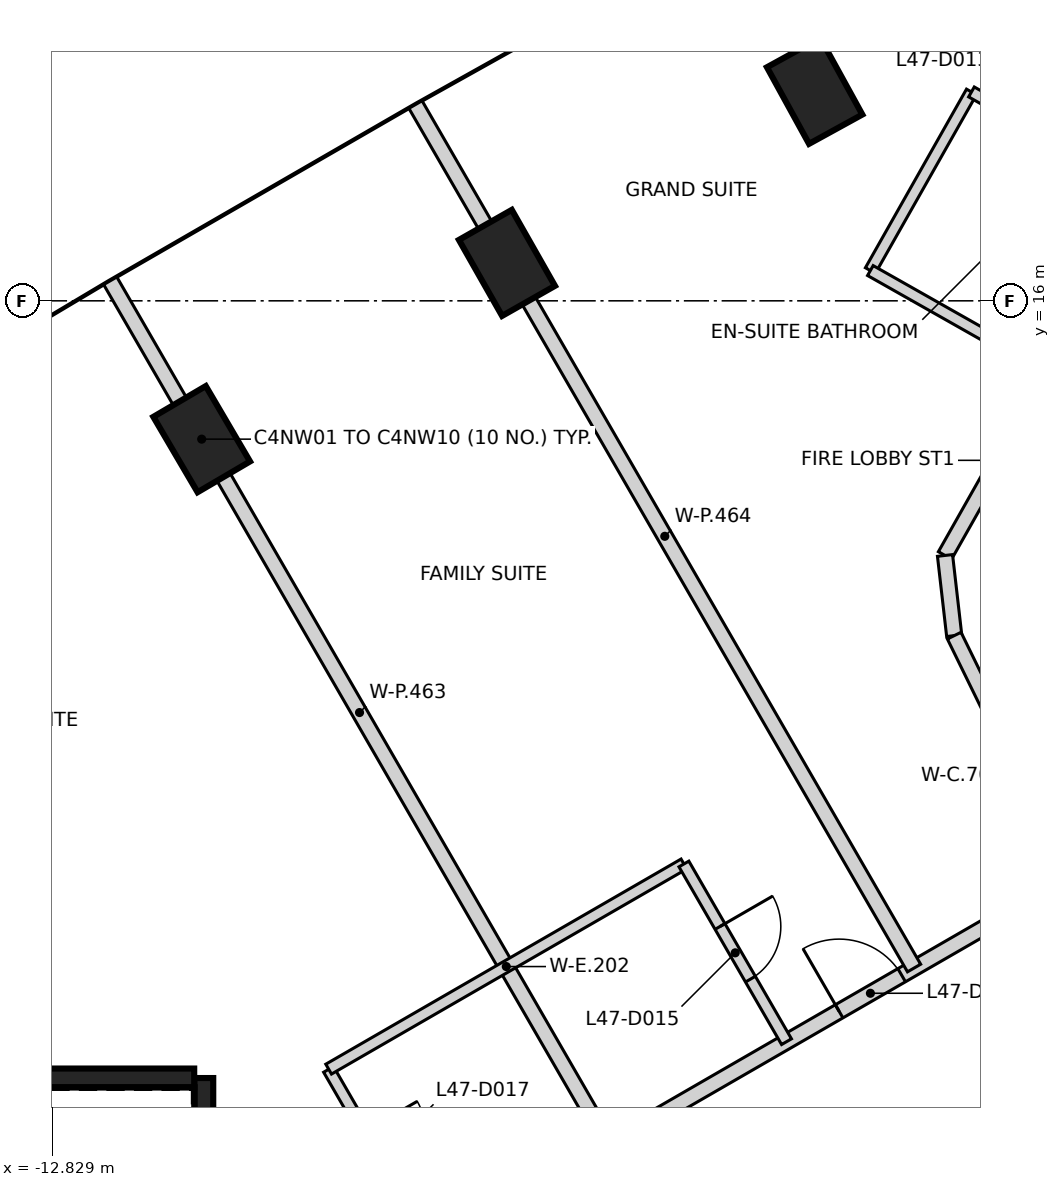
"""IFC4 building model, lengths in metres.
Left out: names, types, materials, properties, quantities, classifications, styles, units other than length and angle.
Written with IfcOpenShell. Run it as: python <this file> out.ifc"""

import sys

from ifc_helpers import new_model, si_unit, direction, frame, frame_2d, origin, origin_2d, place, context, subcontext, project, spatial, rectangle, extrude, element, fill, save


model = new_model("IFC4")
c1 = context("Model", 3, precision=1e-05, world=origin(), true_north=direction((0.0, 1.0)))
c2 = subcontext(c1, "Body", "Model", "MODEL_VIEW")
j1 = project(units=[si_unit("LENGTHUNIT", "METRE"), si_unit("PLANEANGLEUNIT", "RADIAN")], contexts=[c1])
p1 = place(None, origin())
s1 = spatial("IfcSite", under=j1, at=p1, CompositionType="ELEMENT")
p2 = place(p1, origin())
s2 = spatial("IfcBuilding", under=s1, at=p2, CompositionType="ELEMENT")
p3 = place(p2, frame((0.0, 0.0, 190.0)))
s3 = spatial("IfcBuildingStorey", under=s2, at=p3, CompositionType="ELEMENT", Elevation=190.0)
for number, where, z_axis, x_axis in (
    (1, (-2.8, 18.762, -0.35), (0.0, 0.0, 1.0), (-0.482, 0.876, 0.0)),
    (2, (-6.848, 16.499, -0.35), (0.0, 0.0, 1.0), (-0.494, 0.87, 0.0)),
    (3, (-10.864, 14.18, -0.35), (0.0, 0.0, 1.0), (-0.506, 0.862, 0.0)),
):
    element("IfcColumn", number, at=place(p3, frame(where, z_axis=z_axis, x_axis=x_axis)), inside=s3, PredefinedType="COLUMN", context=c2, shape_type="SweptSolid", body=[
        extrude(rectangle(XDim=1.15, YDim=0.8, at=origin_2d()), origin(), (0.0, 0.0, 1.0), 3.6),
    ])
p4 = place(p3, frame((-10.837, 5.775, 0.0), z_axis=(0.0, 0.0, 1.0), x_axis=(0.0, -1.0, 0.0)))
e4 = element("IfcWall", 4, at=p4, inside=s3, PredefinedType="SHEAR", context=c2, shape_type="SweptSolid", body=[
    extrude(rectangle(XDim=11.55, YDim=0.25, at=frame_2d((5.775, 0.0))), origin(), (0.0, 0.0, 1.0), 3.25),
])
p5 = place(p4, frame((10.025, 0.0, 0.0)))
e5 = element("IfcOpeningElement", 5, at=p5, cuts=e4, PredefinedType="OPENING", context=c2, shape_type="SweptSolid", body=[
    extrude(rectangle(XDim=1.2, YDim=2.1, at=frame_2d((0.6, 1.05))), frame((0.0, 0.135, 0.0), z_axis=(0.0, -1.0, 0.0), x_axis=(1.0, 0.0, 0.0)), (0.0, 0.0, 1.0), 0.27),
])
p6 = place(p4, frame((8.725, 0.0, 0.0)))
e6 = element("IfcOpeningElement", 6, at=p6, cuts=e4, PredefinedType="OPENING", context=c2, shape_type="SweptSolid", body=[
    extrude(rectangle(XDim=1.2, YDim=2.1, at=frame_2d((0.6, 1.05))), frame((0.0, 0.135, 0.0), z_axis=(0.0, -1.0, 0.0), x_axis=(1.0, 0.0, 0.0)), (0.0, 0.0, 1.0), 0.27),
])
p7 = place(p3, frame((-16.472, 5.775, 0.0), z_axis=(0.0, 0.0, 1.0), x_axis=(1.0, 0.0, 0.0)))
e7 = element("IfcWall", 7, at=p7, inside=s3, PredefinedType="SHEAR", context=c2, shape_type="SweptSolid", body=[
    extrude(rectangle(XDim=5.51, YDim=0.25, at=frame_2d((2.755, 0.0))), origin(), (0.0, 0.0, 1.0), 3.25),
])
p8 = place(p3, frame((-10.652, 1.934, 0.0), z_axis=(0.0, 0.0, 1.0), x_axis=(0.866066882415, 0.499928150021, 0.0)))
e8 = element("IfcWall", 8, at=p8, inside=s3, PredefinedType="PARTITIONING", context=c2, shape_type="SweptSolid", body=[
    extrude(rectangle(XDim=12.98, YDim=0.2, at=frame_2d((6.49, 0.0))), origin(), (0.0, 0.0, 1.0), 3.25),
])
p9 = place(p8, frame((9.439, 0.0, 0.0)))
e9 = element("IfcOpeningElement", 9, at=p9, cuts=e8, PredefinedType="OPENING", context=c2, shape_type="SweptSolid", body=[
    extrude(rectangle(XDim=0.95, YDim=2.1, at=frame_2d((0.475, 1.05))), frame((0.0, 0.11, 0.0), z_axis=(0.0, -1.0, 0.0), x_axis=(1.0, 0.0, 0.0)), (0.0, 0.0, 1.0), 0.22),
])
p10 = place(p8, frame((0.229, 0.0, 0.0)))
e10 = element("IfcOpeningElement", 10, at=p10, cuts=e8, PredefinedType="OPENING", context=c2, shape_type="SweptSolid", body=[
    extrude(rectangle(XDim=0.95, YDim=2.1, at=frame_2d((0.475, 1.05))), frame((0.0, 0.11, 0.0), z_axis=(0.0, -1.0, 0.0), x_axis=(1.0, 0.0, 0.0)), (0.0, 0.0, 1.0), 0.22),
])
p11 = place(p3, frame((-1.085, 12.65, 0.0), z_axis=(0.0, 0.0, 1.0), x_axis=(0.49243456751, 0.870349468157, 0.0)))
e11 = element("IfcWall", 11, at=p11, inside=s3, PredefinedType="PARTITIONING", context=c2, shape_type="SweptSolid", body=[
    extrude(rectangle(XDim=10.531, YDim=0.2, at=frame_2d((5.266, 0.0))), origin(), (0.0, 0.0, 1.0), 3.25),
])
p12 = place(p11, frame((7.499, 0.0, 0.0)))
e12 = element("IfcOpeningElement", 12, at=p12, cuts=e11, PredefinedType="OPENING", context=c2, shape_type="SweptSolid", body=[
    extrude(rectangle(XDim=1.0, YDim=2.1, at=frame_2d((0.5, 1.05))), frame((0.0, 0.11, 0.0), z_axis=(0.0, -1.0, 0.0), x_axis=(1.0, 0.0, 0.0)), (0.0, 0.0, 1.0), 0.22),
])
p13 = place(p3, frame((-1.085, 12.65, 0.0), z_axis=(0.0, 0.0, 1.0), x_axis=(0.113812454263, -0.993502252264, 0.0)))
e13 = element("IfcWall", 13, at=p13, inside=s3, PredefinedType="PARTITIONING", context=c2, shape_type="SweptSolid", body=[
    extrude(rectangle(XDim=1.062, YDim=0.2, at=frame_2d((0.531, 0.0))), origin(), (0.0, 0.0, 1.0), 3.25),
])
p14 = place(p3, frame((-0.964, 11.595, 0.0), z_axis=(0.0, 0.0, 1.0), x_axis=(0.439787800928, -0.898101714816, 0.0)))
e14 = element("IfcWall", 14, at=p14, inside=s3, PredefinedType="PARTITIONING", context=c2, shape_type="SweptSolid", body=[
    extrude(rectangle(XDim=3.532, YDim=0.2, at=frame_2d((1.766, 0.0))), origin(), (0.0, 0.0, 1.0), 3.25),
])
p15 = place(p14, frame((2.382, 0.0, 0.0)))
e15 = element("IfcOpeningElement", 15, at=p15, cuts=e14, PredefinedType="OPENING", context=c2, shape_type="SweptSolid", body=[
    extrude(rectangle(XDim=0.95, YDim=2.1, at=frame_2d((0.475, 1.05))), frame((0.0, 0.11, 0.0), z_axis=(0.0, -1.0, 0.0), x_axis=(1.0, 0.0, 0.0)), (0.0, 0.0, 1.0), 0.22),
])
p16 = place(p3, frame((-12.067, 16.263, 0.0), z_axis=(0.0, 0.0, 1.0), x_axis=(0.500016190239, -0.866016056144, 0.0)))
e16 = element("IfcWall", 16, at=p16, inside=s3, PredefinedType="PARTITIONING", context=c2, shape_type="SweptSolid", body=[
    extrude(rectangle(XDim=13.118, YDim=0.2, at=frame_2d((6.559, 0.0))), origin(), (0.0, 0.0, 1.0), 3.25),
])
p17 = place(p3, frame((-8.052, 18.582, 0.0), z_axis=(0.0, 0.0, 1.0), x_axis=(0.500046266189, -0.86599869034, 0.0)))
e17 = element("IfcWall", 17, at=p17, inside=s3, PredefinedType="PARTITIONING", context=c2, shape_type="SweptSolid", body=[
    extrude(rectangle(XDim=13.118, YDim=0.2, at=frame_2d((6.559, 0.0))), origin(), (0.0, 0.0, 1.0), 3.25),
])
p18 = place(p3, frame((-1.232, 22.345, 0.0), z_axis=(0.0, 0.0, 1.0), x_axis=(0.499942901263, -0.866058367246, 0.0)))
e18 = element("IfcWall", 18, at=p18, inside=s3, PredefinedType="PARTITIONING", context=c2, shape_type="SweptSolid", body=[
    extrude(rectangle(XDim=5.688, YDim=0.2, at=frame_2d((2.844, 0.0))), origin(), (0.0, 0.0, 1.0), 2.35),
])
p19 = place(p3, frame((-9.195, 5.889, 0.0), z_axis=(0.0, 0.0, 1.0), x_axis=(0.500129820725, -0.865950438779, 0.0)))
e19 = element("IfcWall", 19, at=p19, inside=s3, PredefinedType="PARTITIONING", context=c2, shape_type="SweptSolid", body=[
    extrude(rectangle(XDim=2.698, YDim=0.15, at=frame_2d((1.349, 0.0))), origin(), (0.0, 0.0, 1.0), 3.25),
])
p20 = place(p19, frame((0.948, 0.0, 0.0)))
e20 = element("IfcOpeningElement", 20, at=p20, cuts=e19, PredefinedType="OPENING", context=c2, shape_type="SweptSolid", body=[
    extrude(rectangle(XDim=0.8, YDim=2.1, at=frame_2d((0.4, 1.05))), frame((0.0, 0.085, 0.0), z_axis=(0.0, -1.0, 0.0), x_axis=(1.0, 0.0, 0.0)), (0.0, 0.0, 1.0), 0.17),
])
p21 = place(p3, frame((-9.194, 5.892, 0.0), z_axis=(0.0, 0.0, 1.0), x_axis=(0.8659934935, 0.500055266161, 0.0)))
e21 = element("IfcWall", 21, at=p21, inside=s3, PredefinedType="PARTITIONING", context=c2, shape_type="SweptSolid", body=[
    extrude(rectangle(XDim=5.397, YDim=0.15, at=frame_2d((2.699, 0.0))), origin(), (0.0, 0.0, 1.0), 3.25),
])
p22 = place(p3, frame((-4.52, 8.591, 0.0), z_axis=(0.0, 0.0, 1.0), x_axis=(0.500048589285, -0.86599734893, 0.0)))
e22 = element("IfcWall", 22, at=p22, inside=s3, PredefinedType="PARTITIONING", context=c2, shape_type="SweptSolid", body=[
    extrude(rectangle(XDim=2.7, YDim=0.15, at=frame_2d((1.35, 0.0))), origin(), (0.0, 0.0, 1.0), 3.25),
])
p23 = place(p22, frame((0.95, 0.0, 0.0)))
e23 = element("IfcOpeningElement", 23, at=p23, cuts=e22, PredefinedType="OPENING", context=c2, shape_type="SweptSolid", body=[
    extrude(rectangle(XDim=0.8, YDim=2.1, at=frame_2d((0.4, 1.05))), frame((0.0, 0.085, 0.0), z_axis=(0.0, -1.0, 0.0), x_axis=(1.0, 0.0, 0.0)), (0.0, 0.0, 1.0), 0.17),
])
p24 = place(p3, frame((-2.067, 16.398, 0.0), z_axis=(0.0, 0.0, 1.0), x_axis=(0.492483230042, 0.870321933613, 0.0)))
e24 = element("IfcWall", 24, at=p24, inside=s3, PredefinedType="PARTITIONING", context=c2, shape_type="SweptSolid", body=[
    extrude(rectangle(XDim=2.7, YDim=0.15, at=frame_2d((1.35, 0.0))), origin(), (0.0, 0.0, 1.0), 3.25),
])
p25 = place(p3, frame((-2.067, 16.398, 0.0), z_axis=(0.0, 0.0, 1.0), x_axis=(0.870300002118, -0.492521985614, 0.0)))
e25 = element("IfcWall", 25, at=p25, inside=s3, PredefinedType="PARTITIONING", context=c2, shape_type="SweptSolid", body=[
    extrude(rectangle(XDim=2.7, YDim=0.15, at=frame_2d((1.35, 0.0))), origin(), (0.0, 0.0, 1.0), 3.25),
])
p26 = place(p3, frame((-0.737, 18.748, 0.0), z_axis=(0.0, 0.0, 1.0), x_axis=(0.870283179633, -0.492551710227, 0.0)))
e26 = element("IfcWall", 26, at=p26, inside=s3, PredefinedType="PARTITIONING", context=c2, shape_type="SweptSolid", body=[
    extrude(rectangle(XDim=2.7, YDim=0.15, at=frame_2d((1.35, 0.0))), origin(), (0.0, 0.0, 1.0), 3.25),
])
p27 = place(p26, frame((0.95, 0.0, 0.0)))
e27 = element("IfcOpeningElement", 27, at=p27, cuts=e26, PredefinedType="OPENING", context=c2, shape_type="SweptSolid", body=[
    extrude(rectangle(XDim=0.8, YDim=2.1, at=frame_2d((0.4, 1.05))), frame((0.0, 0.085, 0.0), z_axis=(0.0, -1.0, 0.0), x_axis=(1.0, 0.0, 0.0)), (0.0, 0.0, 1.0), 0.17),
])
p28 = place(p9, origin())
e28 = element("IfcDoor", 28, at=p28, inside=s3, OperationType="SINGLE_SWING_LEFT", PredefinedType="DOOR", context=c2, shape_type="SweptSolid", body=[
    extrude(rectangle(XDim=0.95, YDim=2.1, at=frame_2d((0.475, 1.05))), frame((0.0, 0.025, 0.0), z_axis=(0.0, -1.0, 0.0), x_axis=(1.0, 0.0, 0.0)), (0.0, 0.0, 1.0), 0.05),
])
fill(e9, e28)
p29 = place(p23, frame((0.8, 0.0, 0.0), z_axis=(0.0, 0.0, 1.0), x_axis=(-1.0, 0.0, 0.0)))
e29 = element("IfcDoor", 29, at=p29, inside=s3, OperationType="SINGLE_SWING_LEFT", PredefinedType="DOOR", context=c2, shape_type="SweptSolid", body=[
    extrude(rectangle(XDim=0.8, YDim=2.1, at=frame_2d((0.4, 1.05))), frame((0.0, 0.025, 0.0), z_axis=(0.0, -1.0, 0.0), x_axis=(1.0, 0.0, 0.0)), (0.0, 0.0, 1.0), 0.05),
])
fill(e23, e29)
save(model, sys.argv[1])
